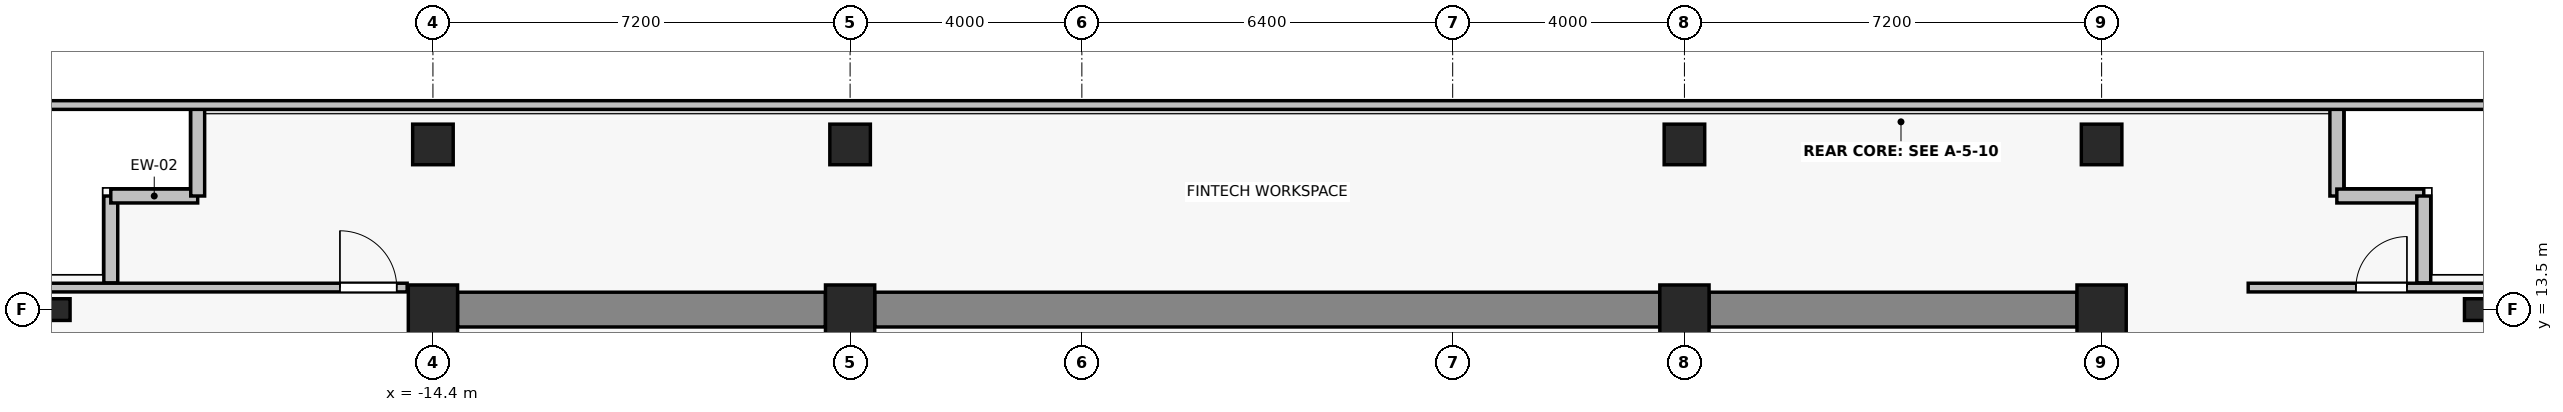
"""IFC4 building model, lengths in metres.
Left out: names, types, materials, properties, quantities, classifications, styles, units other than length and angle.
Written with IfcOpenShell. Run it as: python <this file> out.ifc"""

import sys

from ifc_helpers import new_model, si_unit, direction, frame, frame_2d, origin, origin_2d, place, context, subcontext, project, spatial, rectangle, i_section, extrude, source, transform, mapped, element, fill, save


model = new_model("IFC4")
c1 = context("Model", 3, precision=1e-05, world=origin(), true_north=direction((0.0, 1.0)))
c2 = subcontext(c1, "Body", "Model", "MODEL_VIEW")
j1 = project(units=[si_unit("LENGTHUNIT", "METRE"), si_unit("PLANEANGLEUNIT", "RADIAN")], contexts=[c1])
p1 = place(None, origin())
s1 = spatial("IfcSite", under=j1, at=p1, CompositionType="ELEMENT")
p2 = place(p1, origin())
s2 = spatial("IfcBuilding", under=s1, at=p2, CompositionType="ELEMENT")
p3 = place(p2, frame((0.0, 0.0, 268.3)))
s3 = spatial("IfcBuildingStorey", under=s2, at=p3, CompositionType="ELEMENT", Elevation=268.3)
for number, where, z_axis, x_axis in (
    (1, (-14.4, 13.5, 0.0), (0.0, 0.0, 1.0), (1.0, 0.0, 0.0)),
    (2, (-7.2, 13.5, 0.0), (0.0, 0.0, 1.0), (1.0, 0.0, 0.0)),
    (3, (7.2, 13.5, 0.0), (0.0, 0.0, 1.0), (1.0, 0.0, 0.0)),
    (4, (14.4, 13.5, 0.0), (0.0, 0.0, 1.0), (1.0, 0.0, 0.0)),
):
    element("IfcColumn", number, at=place(p3, frame(where, z_axis=z_axis, x_axis=x_axis)), inside=s3, PredefinedType="COLUMN", context=c2, shape_type="SweptSolid", body=[
        extrude(rectangle(XDim=0.85, YDim=0.85, at=origin_2d()), origin(), (0.0, 0.0, 1.0), 3.3),
    ])
for number, where, z_axis, x_axis in (
    (5, (-14.4, 16.35, 0.0), (0.0, 0.0, 1.0), (1.0, 0.0, 0.0)),
    (6, (-7.2, 16.35, 0.0), (0.0, 0.0, 1.0), (1.0, 0.0, 0.0)),
    (7, (7.2, 16.35, 0.0), (0.0, 0.0, 1.0), (1.0, 0.0, 0.0)),
    (8, (14.4, 16.35, 0.0), (0.0, 0.0, 1.0), (1.0, 0.0, 0.0)),
):
    element("IfcColumn", number, at=place(p3, frame(where, z_axis=z_axis, x_axis=x_axis)), inside=s3, PredefinedType="COLUMN", context=c2, shape_type="SweptSolid", body=[
        extrude(rectangle(XDim=0.7, YDim=0.7, at=origin_2d()), origin(), (0.0, 0.0, 1.0), 3.3),
    ])
for number, where, z_axis, x_axis in (
    (9, (-20.85, 13.5, 0.0), (0.0, 0.0, 1.0), (1.0, 0.0, 0.0)),
    (10, (20.85, 13.5, 0.0), (0.0, 0.0, 1.0), (1.0, 0.0, 0.0)),
):
    element("IfcColumn", number, at=place(p3, frame(where, z_axis=z_axis, x_axis=x_axis)), inside=s3, PredefinedType="COLUMN", context=c2, shape_type="SweptSolid", body=[
        extrude(i_section(OverallWidth=0.375, OverallDepth=0.375, WebThickness=0.017, FlangeThickness=0.027, FilletRadius=0.015, at=origin_2d()), origin(), (0.0, 0.0, 1.0), 3.3),
    ])
p4 = place(p3, frame((-13.975, 13.5, 0.0), z_axis=(0.0, 0.0, 1.0), x_axis=(1.0, 0.0, 0.0)))
e11 = element("IfcWall", 11, at=p4, inside=s3, PredefinedType="SHEAR", context=c2, shape_type="SweptSolid", body=[
    extrude(rectangle(XDim=6.35, YDim=0.6, at=frame_2d((3.175, 0.0))), origin(), (0.0, 0.0, 1.0), 3.08),
])
p5 = place(p3, frame((-6.775, 13.5, 0.0), z_axis=(0.0, 0.0, 1.0), x_axis=(1.0, 0.0, 0.0)))
e12 = element("IfcWall", 12, at=p5, inside=s3, PredefinedType="SHEAR", context=c2, shape_type="SweptSolid", body=[
    extrude(rectangle(XDim=13.55, YDim=0.6, at=frame_2d((6.775, 0.0))), origin(), (0.0, 0.0, 1.0), 3.08),
])
p6 = place(p3, frame((7.625, 13.5, 0.0), z_axis=(0.0, 0.0, 1.0), x_axis=(1.0, 0.0, 0.0)))
e13 = element("IfcWall", 13, at=p6, inside=s3, PredefinedType="SHEAR", context=c2, shape_type="SweptSolid", body=[
    extrude(rectangle(XDim=6.35, YDim=0.6, at=frame_2d((3.175, 0.0))), origin(), (0.0, 0.0, 1.0), 3.08),
])
for number, where, z_axis, x_axis in (
    (14, (-19.96, 15.46, 0.0), (0.0, 0.0, 1.0), (0.0, -1.0, 0.0)),
    (15, (-18.46, 15.46, 0.0), (0.0, 0.0, 1.0), (-1.0, 0.0, 0.0)),
    (16, (-18.46, 16.96, 0.0), (0.0, 0.0, 1.0), (0.0, -1.0, 0.0)),
    (17, (18.46, 15.46, 0.0), (0.0, 0.0, 1.0), (0.0, 1.0, 0.0)),
    (18, (19.96, 15.46, 0.0), (0.0, 0.0, 1.0), (-1.0, 0.0, 0.0)),
    (19, (19.96, 13.96, 0.0), (0.0, 0.0, 1.0), (0.0, 1.0, 0.0)),
):
    element("IfcWall", number, at=place(p3, frame(where, z_axis=z_axis, x_axis=x_axis)), inside=s3, PredefinedType="SOLIDWALL", context=c2, shape_type="SweptSolid", body=[
        extrude(rectangle(XDim=1.5, YDim=0.24, at=frame_2d((0.75, 0.0))), origin(), (0.0, 0.0, 1.0), 3.08),
    ])
p7 = place(p3, frame((-21.53, 13.88, 0.0), z_axis=(0.0, 0.0, 1.0), x_axis=(1.0, 0.0, 0.0)))
e20 = element("IfcWall", 20, at=p7, inside=s3, PredefinedType="PARTITIONING", context=c2, shape_type="SweptSolid", body=[
    extrude(rectangle(XDim=6.685, YDim=0.15, at=frame_2d((3.343, 0.0))), origin(), (0.0, 0.0, 1.0), 3.08),
])
p8 = place(p7, frame((5.525, 0.0, 0.0)))
e21 = element("IfcOpeningElement", 21, at=p8, cuts=e20, PredefinedType="OPENING", context=c2, shape_type="SweptSolid", body=[
    extrude(rectangle(XDim=0.98, YDim=2.15, at=frame_2d((0.49, 1.075))), frame((0.0, 0.085, 0.0), z_axis=(0.0, -1.0, 0.0), x_axis=(1.0, 0.0, 0.0)), (0.0, 0.0, 1.0), 0.17),
])
p9 = place(p3, frame((16.93, 13.88, 0.0), z_axis=(0.0, 0.0, 1.0), x_axis=(1.0, 0.0, 0.0)))
e22 = element("IfcWall", 22, at=p9, inside=s3, PredefinedType="PARTITIONING", context=c2, shape_type="SweptSolid", body=[
    extrude(rectangle(XDim=4.6, YDim=0.15, at=frame_2d((2.3, 0.0))), origin(), (0.0, 0.0, 1.0), 3.08),
])
p10 = place(p9, frame((1.86, 0.0, 0.0)))
e23 = element("IfcOpeningElement", 23, at=p10, cuts=e22, PredefinedType="OPENING", context=c2, shape_type="SweptSolid", body=[
    extrude(rectangle(XDim=0.88, YDim=2.1, at=frame_2d((0.44, 1.05))), frame((0.0, 0.085, 0.0), z_axis=(0.0, -1.0, 0.0), x_axis=(1.0, 0.0, 0.0)), (0.0, 0.0, 1.0), 0.17),
])
p11 = place(p3, frame((-21.53, 17.03, 0.0), z_axis=(0.0, 0.0, 1.0), x_axis=(1.0, 0.0, 0.0)))
e24 = element("IfcWall", 24, at=p11, inside=s3, PredefinedType="PARTITIONING", context=c2, shape_type="SweptSolid", body=[
    extrude(rectangle(XDim=43.06, YDim=0.15, at=frame_2d((21.53, 0.0))), origin(), (0.0, 0.0, 1.0), 3.08),
])
m1 = source(origin(), c2, "Body", "SweptSolid", [
    extrude(rectangle(XDim=0.98, YDim=2.15, at=frame_2d((0.49, 1.075))), frame((0.0, 0.025, 0.0), z_axis=(0.0, -1.0, 0.0), x_axis=(1.0, 0.0, 0.0)), (0.0, 0.0, 1.0), 0.05),
])
p12 = place(p8, origin())
e25 = element("IfcDoor", 25, at=p12, inside=s3, OperationType="SINGLE_SWING_LEFT", PredefinedType="DOOR", context=c2, shape_type="MappedRepresentation", body=[
    mapped(m1, transform((0.0, 0.0, 0.0), x_axis=(1.0, 0.0, 0.0), y_axis=(0.0, 1.0, 0.0), z_axis=(0.0, 0.0, 1.0), scale=1.0)),
])
fill(e21, e25)
m2 = source(origin(), c2, "Body", "SweptSolid", [
    extrude(rectangle(XDim=0.88, YDim=2.1, at=frame_2d((0.44, 1.05))), frame((0.0, 0.025, 0.0), z_axis=(0.0, -1.0, 0.0), x_axis=(1.0, 0.0, 0.0)), (0.0, 0.0, 1.0), 0.05),
])
p13 = place(p10, origin())
e26 = element("IfcDoor", 26, at=p13, inside=s3, OperationType="SINGLE_SWING_RIGHT", PredefinedType="DOOR", context=c2, shape_type="MappedRepresentation", body=[
    mapped(m2, transform((0.0, 0.0, 0.0), x_axis=(1.0, 0.0, 0.0), y_axis=(0.0, 1.0, 0.0), z_axis=(0.0, 0.0, 1.0), scale=1.0)),
])
fill(e23, e26)
save(model, sys.argv[1])
